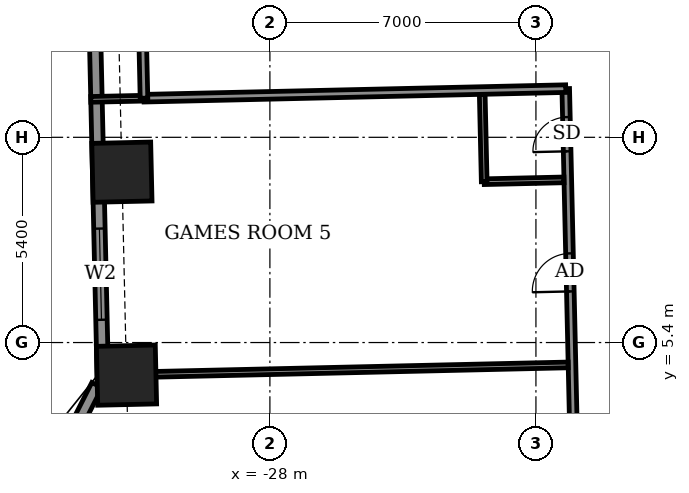
"""IFC4 building model, lengths in metres.
Left out: names, types, materials, properties, quantities, classifications, styles, units other than length and angle.
Written with IfcOpenShell. Run it as: python <this file> out.ifc"""

import sys

from ifc_helpers import new_model, si_unit, direction, frame, frame_2d, origin, origin_2d, place, context, subcontext, project, spatial, rectangle, extrude, element, fill, save


model = new_model("IFC4")
c1 = context("Model", 3, precision=1e-05, world=origin(), true_north=direction((0.0, 1.0)))
c2 = subcontext(c1, "Body", "Model", "MODEL_VIEW")
j1 = project(units=[si_unit("LENGTHUNIT", "METRE"), si_unit("PLANEANGLEUNIT", "RADIAN")], contexts=[c1])
p1 = place(None, origin())
s1 = spatial("IfcSite", under=j1, at=p1, CompositionType="ELEMENT")
p2 = place(p1, origin())
s2 = spatial("IfcBuilding", under=s1, at=p2, CompositionType="ELEMENT")
p3 = place(p2, frame((0.0, 0.0, 41.3)))
s3 = spatial("IfcBuildingStorey", under=s2, at=p3, CompositionType="ELEMENT", Elevation=41.3)
for number, where, z_axis, x_axis in (
    (1, (-31.894, 9.883, -0.55), (0.0, 0.0, 1.0), (0.023, -1.0, 0.0)),
    (2, (-31.773, 4.542, -0.55), (0.0, 0.0, 1.0), (0.023, -1.0, 0.0)),
):
    element("IfcColumn", number, at=place(p3, frame(where, z_axis=z_axis, x_axis=x_axis)), inside=s3, PredefinedType="COLUMN", context=c2, shape_type="SweptSolid", body=[
        extrude(rectangle(XDim=1.55, YDim=1.55, at=origin_2d()), origin(), (0.0, 0.0, 1.0), 3.6),
    ])
p4 = place(p3, frame((-32.758, 20.399, 0.0), z_axis=(0.0, 0.0, 1.0), x_axis=(0.022668485183, -0.999743036875, 0.0)))
e3 = element("IfcWall", 3, at=p4, inside=s3, PredefinedType="SOLIDWALL", context=c2, shape_type="SweptSolid", body=[
    extrude(rectangle(XDim=15.929, YDim=0.3, at=frame_2d((7.964, 0.0))), origin(), (0.0, 0.0, 1.0), 3.05),
])
p5 = place(p4, frame((2.183, 0.0, 0.0)))
e4 = element("IfcOpeningElement", 4, at=p5, cuts=e3, PredefinedType="OPENING", context=c2, shape_type="SweptSolid", body=[
    extrude(rectangle(XDim=1.5, YDim=2.4, at=frame_2d((0.75, 1.2))), frame((0.0, 0.16, 0.0), z_axis=(0.0, -1.0, 0.0), x_axis=(1.0, 0.0, 0.0)), (0.0, 0.0, 1.0), 0.32),
])
p6 = place(p4, frame((12.004, 0.0, 0.9)))
e5 = element("IfcOpeningElement", 5, at=p6, cuts=e3, PredefinedType="OPENING", context=c2, shape_type="SweptSolid", body=[
    extrude(rectangle(XDim=2.4, YDim=1.5, at=frame_2d((1.2, 0.75))), frame((0.0, 0.16, 0.0), z_axis=(0.0, -1.0, 0.0), x_axis=(1.0, 0.0, 0.0)), (0.0, 0.0, 1.0), 0.32),
])
p7 = place(p3, frame((-32.552, 4.28, 0.0), z_axis=(0.0, 0.0, 1.0), x_axis=(-0.452703975507, -0.891660871946, 0.0)))
e6 = element("IfcWall", 6, at=p7, inside=s3, PredefinedType="SOLIDWALL", context=c2, shape_type="SweptSolid", body=[
    extrude(rectangle(XDim=5.399, YDim=0.3, at=frame_2d((2.699, 0.0))), origin(), (0.0, 0.0, 1.0), 3.05),
])
p8 = place(p7, frame((2.007, 0.0, 0.9)))
e7 = element("IfcOpeningElement", 7, at=p8, cuts=e6, PredefinedType="OPENING", context=c2, shape_type="SweptSolid", body=[
    extrude(rectangle(XDim=1.2, YDim=1.5, at=frame_2d((0.6, 0.75))), frame((0.0, 0.16, 0.0), z_axis=(0.0, -1.0, 0.0), x_axis=(1.0, 0.0, 0.0)), (0.0, 0.0, 1.0), 0.32),
])
p9 = place(p3, frame((-33.853, 4.746, 0.0), z_axis=(0.0, 0.0, 1.0), x_axis=(-0.02268847822, 0.999742583346, 0.0)))
e8 = element("IfcWall", 8, at=p9, inside=s3, PredefinedType="USERDEFINED", context=c2, shape_type="SweptSolid", body=[
    extrude(rectangle(XDim=3.874, YDim=0.55, at=frame_2d((1.937, 0.0))), origin(), (0.0, 0.0, 1.0), 0.8),
])
p10 = place(p3, frame((-19.589, -15.562, 0.0), z_axis=(0.0, 0.0, 1.0), x_axis=(-0.02267447203, 0.999742901109, 0.0)))
e9 = element("IfcWall", 9, at=p10, inside=s3, PredefinedType="PARTITIONING", context=c2, shape_type="SweptSolid", body=[
    extrude(rectangle(XDim=27.65, YDim=0.2, at=frame_2d((13.825, 0.0))), origin(), (0.0, 0.0, 1.0), 3.05),
])
p11 = place(p10, frame((22.313, 0.0, 0.0)))
e10 = element("IfcOpeningElement", 10, at=p11, cuts=e9, PredefinedType="OPENING", context=c2, shape_type="SweptSolid", body=[
    extrude(rectangle(XDim=1.0, YDim=2.1, at=frame_2d((0.5, 1.05))), frame((0.0, 0.11, 0.0), z_axis=(0.0, -1.0, 0.0), x_axis=(1.0, 0.0, 0.0)), (0.0, 0.0, 1.0), 0.22),
])
p12 = place(p10, frame((26.0, 0.0, 0.0)))
e11 = element("IfcOpeningElement", 11, at=p12, cuts=e9, PredefinedType="OPENING", context=c2, shape_type="SweptSolid", body=[
    extrude(rectangle(XDim=0.9, YDim=2.1, at=frame_2d((0.45, 1.05))), frame((0.0, 0.11, 0.0), z_axis=(0.0, -1.0, 0.0), x_axis=(1.0, 0.0, 0.0)), (0.0, 0.0, 1.0), 0.22),
])
p13 = place(p10, frame((17.843, 0.0, 0.0)))
e12 = element("IfcOpeningElement", 12, at=p13, cuts=e9, PredefinedType="OPENING", context=c2, shape_type="SweptSolid", body=[
    extrude(rectangle(XDim=1.0, YDim=2.1, at=frame_2d((0.5, 1.05))), frame((0.0, 0.11, 0.0), z_axis=(0.0, -1.0, 0.0), x_axis=(1.0, 0.0, 0.0)), (0.0, 0.0, 1.0), 0.22),
])
p14 = place(p10, frame((13.592, 0.0, 0.0)))
e13 = element("IfcOpeningElement", 13, at=p14, cuts=e9, PredefinedType="OPENING", context=c2, shape_type="SweptSolid", body=[
    extrude(rectangle(XDim=1.0, YDim=2.1, at=frame_2d((0.5, 1.05))), frame((0.0, 0.11, 0.0), z_axis=(0.0, -1.0, 0.0), x_axis=(1.0, 0.0, 0.0)), (0.0, 0.0, 1.0), 0.22),
])
p15 = place(p10, frame((10.0, 0.0, 0.0)))
e14 = element("IfcOpeningElement", 14, at=p15, cuts=e9, PredefinedType="OPENING", context=c2, shape_type="SweptSolid", body=[
    extrude(rectangle(XDim=1.0, YDim=2.1, at=frame_2d((0.5, 1.05))), frame((0.0, 0.11, 0.0), z_axis=(0.0, -1.0, 0.0), x_axis=(1.0, 0.0, 0.0)), (0.0, 0.0, 1.0), 0.22),
])
p16 = place(p10, frame((7.475, 0.0, 0.0)))
e15 = element("IfcOpeningElement", 15, at=p16, cuts=e9, PredefinedType="OPENING", context=c2, shape_type="SweptSolid", body=[
    extrude(rectangle(XDim=0.9, YDim=2.1, at=frame_2d((0.45, 1.05))), frame((0.0, 0.11, 0.0), z_axis=(0.0, -1.0, 0.0), x_axis=(1.0, 0.0, 0.0)), (0.0, 0.0, 1.0), 0.22),
])
p17 = place(p10, frame((4.613, 0.0, 0.0)))
e16 = element("IfcOpeningElement", 16, at=p17, cuts=e9, PredefinedType="OPENING", context=c2, shape_type="SweptSolid", body=[
    extrude(rectangle(XDim=1.0, YDim=2.1, at=frame_2d((0.5, 1.05))), frame((0.0, 0.11, 0.0), z_axis=(0.0, -1.0, 0.0), x_axis=(1.0, 0.0, 0.0)), (0.0, 0.0, 1.0), 0.22),
])
p18 = place(p3, frame((-32.248, 4.536, 0.0), z_axis=(0.0, 0.0, 1.0), x_axis=(0.999741439573, 0.022738821441, 0.0)))
e17 = element("IfcWall", 17, at=p18, inside=s3, PredefinedType="PARTITIONING", context=c2, shape_type="SweptSolid", body=[
    extrude(rectangle(XDim=12.1, YDim=0.15, at=frame_2d((6.05, 0.0))), origin(), (0.0, 0.0, 1.0), 3.05),
])
p19 = place(p3, frame((-22.361, 9.632, 0.0), z_axis=(0.0, 0.0, 1.0), x_axis=(0.999740272436, 0.02279007832, 0.0)))
e18 = element("IfcWall", 18, at=p19, inside=s3, PredefinedType="PARTITIONING", context=c2, shape_type="SweptSolid", body=[
    extrude(rectangle(XDim=2.1, YDim=0.15, at=frame_2d((1.05, 0.0))), origin(), (0.0, 0.0, 1.0), 3.05),
])
p20 = place(p3, frame((-22.361, 9.632, 0.0), z_axis=(0.0, 0.0, 1.0), x_axis=(-0.022615284993, 0.999744241736, 0.0)))
e19 = element("IfcWall", 19, at=p20, inside=s3, PredefinedType="PARTITIONING", context=c2, shape_type="SweptSolid", body=[
    extrude(rectangle(XDim=2.299, YDim=0.15, at=frame_2d((1.15, 0.0))), origin(), (0.0, 0.0, 1.0), 3.05),
])
p21 = place(p3, frame((-32.713, 11.798, 0.0), z_axis=(0.0, 0.0, 1.0), x_axis=(0.999756172383, 0.022081571112, 0.0)))
e20 = element("IfcWall", 20, at=p21, inside=s3, PredefinedType="PARTITIONING", context=c2, shape_type="SweptSolid", body=[
    extrude(rectangle(XDim=1.404, YDim=0.15, at=frame_2d((0.702, 0.0))), origin(), (0.0, 0.0, 1.0), 2.55),
])
p22 = place(p3, frame((-31.313, 11.829, 0.0), z_axis=(0.0, 0.0, 1.0), x_axis=(0.999742346277, 0.022698921993, 0.0)))
e21 = element("IfcWall", 21, at=p22, inside=s3, PredefinedType="PARTITIONING", context=c2, shape_type="SweptSolid", body=[
    extrude(rectangle(XDim=11.1, YDim=0.2, at=frame_2d((5.55, 0.0))), origin(), (0.0, 0.0, 1.0), 3.05),
])
p23 = place(p3, frame((-31.313, 11.829, 0.0), z_axis=(0.0, 0.0, 1.0), x_axis=(-0.022617910375, 0.999744182344, 0.0)))
e22 = element("IfcWall", 22, at=p23, inside=s3, PredefinedType="PARTITIONING", context=c2, shape_type="SweptSolid", body=[
    extrude(rectangle(XDim=1.5, YDim=0.2, at=frame_2d((0.75, 0.0))), origin(), (0.0, 0.0, 1.0), 3.05),
])
p24 = place(p6, origin())
e23 = element("IfcWindow", 23, at=p24, inside=s3, PartitioningType="DOUBLE_PANEL_VERTICAL", PredefinedType="WINDOW", context=c2, shape_type="SweptSolid", body=[
    extrude(rectangle(XDim=2.4, YDim=1.5, at=frame_2d((1.2, 0.75))), frame((0.0, 0.03, 0.0), z_axis=(0.0, -1.0, 0.0), x_axis=(1.0, 0.0, 0.0)), (0.0, 0.0, 1.0), 0.06),
])
fill(e5, e23)
p25 = place(p11, origin())
e24 = element("IfcDoor", 24, at=p25, inside=s3, OperationType="SINGLE_SWING_LEFT", PredefinedType="DOOR", context=c2, shape_type="SweptSolid", body=[
    extrude(rectangle(XDim=1.0, YDim=2.1, at=frame_2d((0.5, 1.05))), frame((0.0, 0.025, 0.0), z_axis=(0.0, -1.0, 0.0), x_axis=(1.0, 0.0, 0.0)), (0.0, 0.0, 1.0), 0.05),
])
fill(e10, e24)
p26 = place(p12, origin())
e25 = element("IfcDoor", 25, at=p26, inside=s3, OperationType="SINGLE_SWING_RIGHT", PredefinedType="DOOR", context=c2, shape_type="SweptSolid", body=[
    extrude(rectangle(XDim=0.9, YDim=2.1, at=frame_2d((0.45, 1.05))), frame((0.0, 0.025, 0.0), z_axis=(0.0, -1.0, 0.0), x_axis=(1.0, 0.0, 0.0)), (0.0, 0.0, 1.0), 0.05),
])
fill(e11, e25)
save(model, sys.argv[1])
